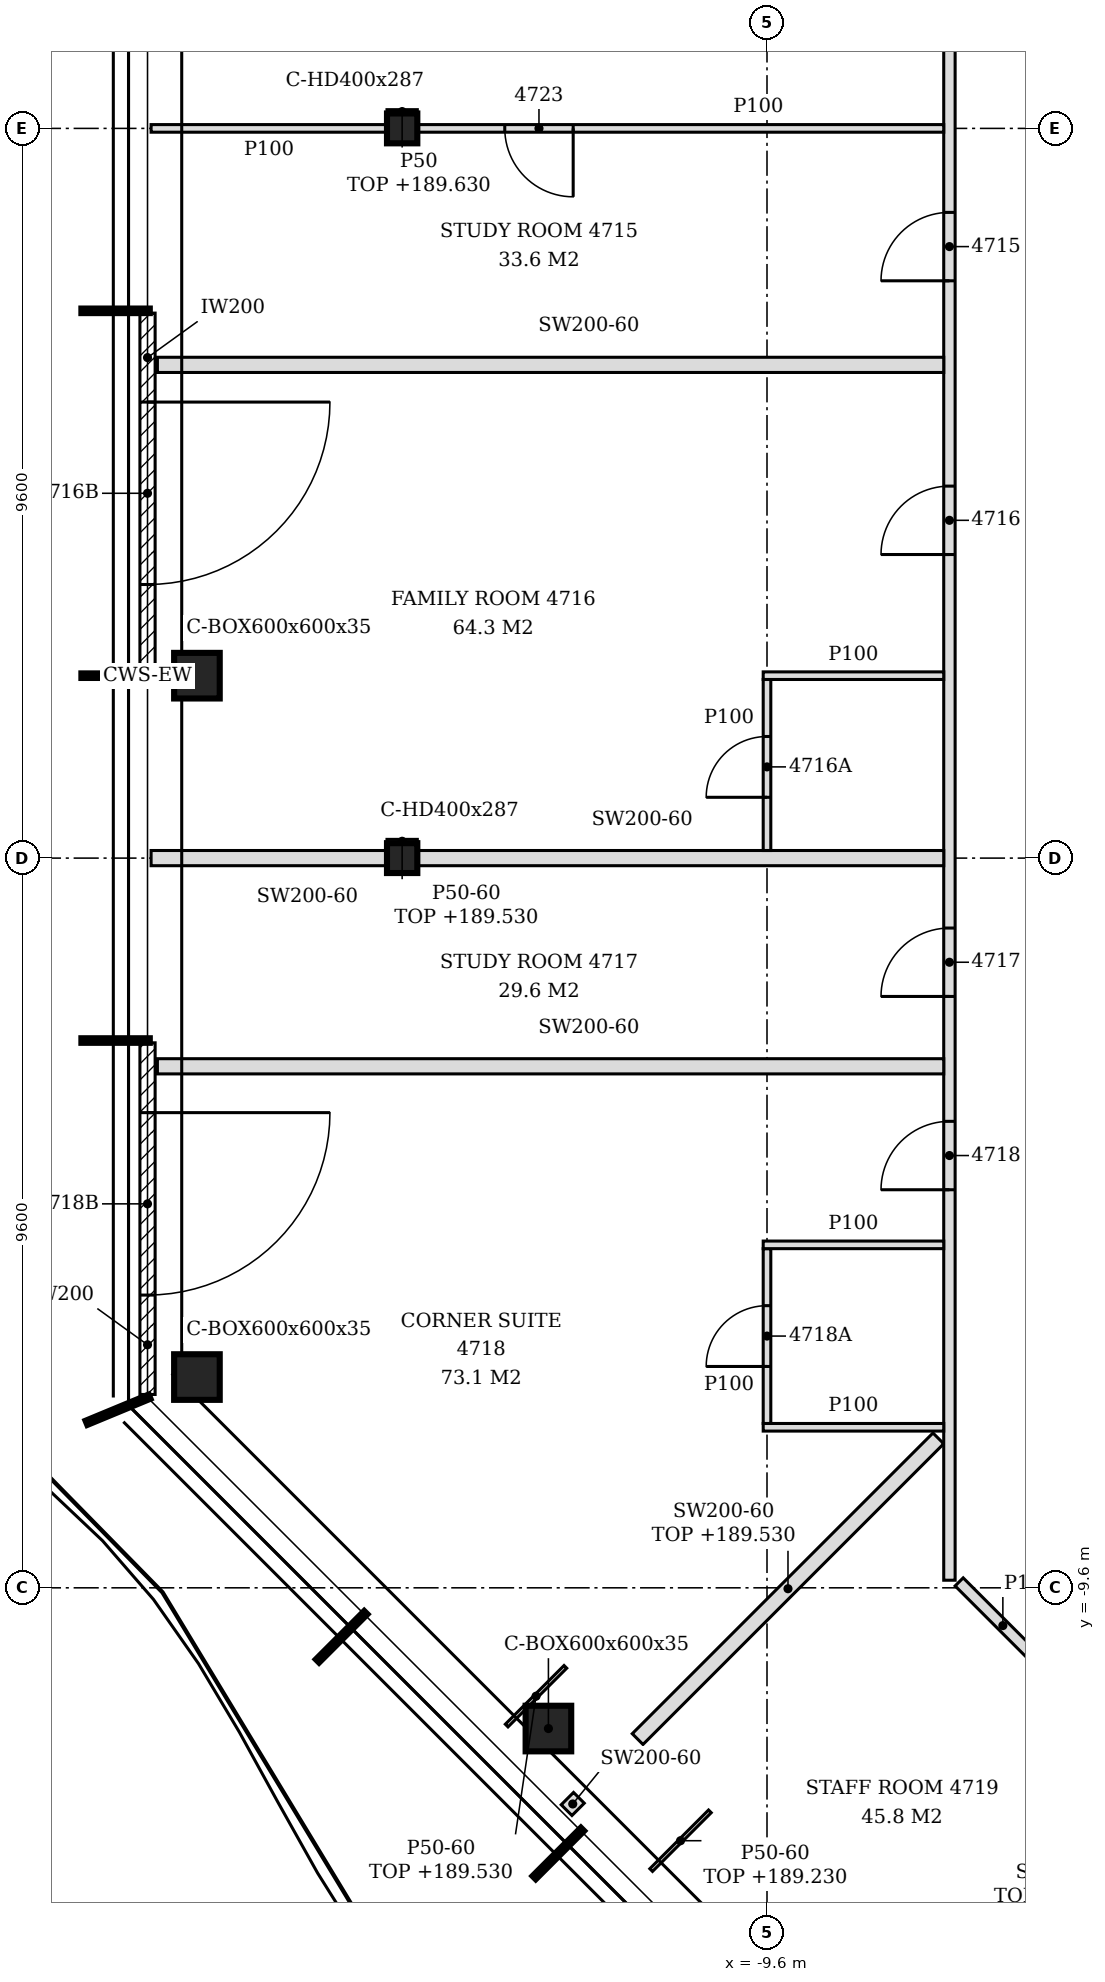
"""IFC4 building model, lengths in metres.
Left out: names, types, materials, properties, quantities, classifications, styles, units other than length and angle.
Written with IfcOpenShell. Run it as: python <this file> out.ifc"""

import sys

from ifc_helpers import new_model, si_unit, direction, frame, frame_2d, origin, origin_2d, place, context, subcontext, project, spatial, polyline, rectangle, hollow_rectangle, i_section, outline, extrude, clip, halfspace, element, fill, save


model = new_model("IFC4")
c1 = context("Model", 3, precision=1e-05, world=origin(), true_north=direction((0.0, 1.0)))
c2 = subcontext(c1, "Body", "Model", "MODEL_VIEW")
j1 = project(units=[si_unit("LENGTHUNIT", "METRE"), si_unit("PLANEANGLEUNIT", "RADIAN")], contexts=[c1])
p1 = place(None, origin())
s1 = spatial("IfcSite", under=j1, at=p1, CompositionType="ELEMENT")
p2 = place(p1, origin())
s2 = spatial("IfcBuilding", under=s1, at=p2, CompositionType="ELEMENT")
p3 = place(p2, frame((0.0, 0.0, 186.6)))
s3 = spatial("IfcBuildingStorey", under=s2, at=p3, CompositionType="ELEMENT", Elevation=186.6)
p4 = place(p3, frame((-17.1, 11.627, -0.15), z_axis=(0.38726387287, -0.258155907814, 0.885088820419), x_axis=(0.554670435147, 0.832070134288, 0.0)))
e1 = element("IfcColumn", 1, at=p4, inside=s3, PredefinedType="COLUMN", context=c2, shape_type="Clipping", body=[
    clip(extrude(hollow_rectangle(XDim=0.6, YDim=0.6, WallThickness=0.035, at=origin_2d()), origin(), (0.0, 0.0, 1.0), 4.067), halfspace(frame((0.0, 0.0, 4.049), z_axis=(0.0, 0.0, 1.0), x_axis=(1.0, 0.0, 0.0)), False)),
])
p5 = place(p3, frame((-17.1, 2.4, -0.15), z_axis=(0.387269873009, -0.258099884367, 0.885102533693), x_axis=(0.55458113914, 0.832129653426, 0.0)))
e2 = element("IfcColumn", 2, at=p5, inside=s3, PredefinedType="COLUMN", context=c2, shape_type="Clipping", body=[
    clip(extrude(hollow_rectangle(XDim=0.6, YDim=0.6, WallThickness=0.035, at=origin_2d()), origin(), (0.0, 0.0, 1.0), 4.067), halfspace(frame((0.0, 0.0, 4.049), z_axis=(0.0, 0.0, 1.0), x_axis=(1.0, 0.0, 0.0)), False)),
])
p6 = place(p3, frame((-17.1, -6.827, -0.15), z_axis=(0.38726387287, -0.258155907814, 0.885088820419), x_axis=(0.554670435147, 0.832070134288, 0.0)))
e3 = element("IfcColumn", 3, at=p6, inside=s3, PredefinedType="COLUMN", context=c2, shape_type="Clipping", body=[
    clip(extrude(hollow_rectangle(XDim=0.6, YDim=0.6, WallThickness=0.035, at=origin_2d()), origin(), (0.0, 0.0, 1.0), 4.067), halfspace(frame((0.0, 0.0, 4.049), z_axis=(0.0, 0.0, 1.0), x_axis=(1.0, 0.0, 0.0)), False)),
])
p7 = place(p3, frame((-12.476, -11.451, -0.15), z_axis=(0.387212850535, -0.258161908255, 0.885109392961), x_axis=(0.554729959787, 0.832030451194, 0.0)))
e4 = element("IfcColumn", 4, at=p7, inside=s3, PredefinedType="COLUMN", context=c2, shape_type="Clipping", body=[
    clip(extrude(hollow_rectangle(XDim=0.6, YDim=0.6, WallThickness=0.035, at=origin_2d()), origin(), (0.0, 0.0, 1.0), 4.067), halfspace(frame((0.0, 0.0, 4.049), z_axis=(0.0, 0.0, 1.0), x_axis=(1.0, 0.0, 0.0)), False)),
])
for number, where, z_axis, x_axis in (
    (5, (-14.4, 0.0, -0.15), (0.0, 0.0, 1.0), (1.0, 0.0, 0.0)),
    (6, (-14.4, 9.6, -0.15), (0.0, 0.0, 1.0), (1.0, 0.0, 0.0)),
):
    element("IfcColumn", number, at=place(p3, frame(where, z_axis=z_axis, x_axis=x_axis)), inside=s3, PredefinedType="COLUMN", context=c2, shape_type="SweptSolid", body=[
        extrude(i_section(OverallWidth=0.399, OverallDepth=0.393, WebThickness=0.023, FlangeThickness=0.037, FilletRadius=0.015, at=origin_2d()), origin(), (0.0, 0.0, 1.0), 3.6),
    ])
p8 = place(p3, frame((-17.75, 7.17, 0.0), z_axis=(0.0, 0.0, 1.0), x_axis=(0.0, -1.0, 0.0)))
e7 = element("IfcWall", 7, at=p8, inside=s3, PredefinedType="NOTDEFINED", context=c2, shape_type="SweptSolid", body=[
    extrude(rectangle(XDim=4.74, YDim=0.2, at=frame_2d((2.37, 0.0))), origin(), (0.0, 0.0, 1.0), 3.45),
])
p9 = place(p8, frame((1.17, 0.0, 0.0)))
e8 = element("IfcOpeningElement", 8, at=p9, cuts=e7, PredefinedType="OPENING", context=c2, shape_type="SweptSolid", body=[
    extrude(rectangle(XDim=2.4, YDim=2.4, at=frame_2d((1.2, 1.2))), frame((0.0, 0.11, 0.0), z_axis=(0.0, -1.0, 0.0), x_axis=(1.0, 0.0, 0.0)), (0.0, 0.0, 1.0), 0.22),
])
p10 = place(p3, frame((-17.75, -2.43, 0.0), z_axis=(0.0, 0.0, 1.0), x_axis=(0.0, -1.0, 0.0)))
e9 = element("IfcWall", 9, at=p10, inside=s3, PredefinedType="NOTDEFINED", context=c2, shape_type="SweptSolid", body=[
    extrude(rectangle(XDim=4.626, YDim=0.2, at=frame_2d((2.313, 0.0))), origin(), (0.0, 0.0, 1.0), 3.45),
])
p11 = place(p10, frame((0.919, 0.0, 0.0)))
e10 = element("IfcOpeningElement", 10, at=p11, cuts=e9, PredefinedType="OPENING", context=c2, shape_type="SweptSolid", body=[
    extrude(rectangle(XDim=2.4, YDim=2.4, at=frame_2d((1.2, 1.2))), frame((0.0, 0.11, 0.0), z_axis=(0.0, -1.0, 0.0), x_axis=(1.0, 0.0, 0.0)), (0.0, 0.0, 1.0), 0.22),
])
p12 = place(p3, frame((-6.678, -16.214, 0.0), z_axis=(0.0, 0.0, 1.0), x_axis=(0.707199650476, 0.707013899698, 0.0)))
e11 = element("IfcWall", 11, at=p12, inside=s3, PredefinedType="PARTITIONING", context=c2, shape_type="SweptSolid", body=[
    extrude(rectangle(XDim=5.257, YDim=0.2, at=frame_2d((2.629, 0.0))), origin(), (0.0, 0.0, 1.0), 2.83),
])
p13 = place(p3, frame((-12.237, -12.525, 0.0), z_axis=(0.0, 0.0, 1.0), x_axis=(0.706574521886, 0.707638640142, 0.0)))
e12 = element("IfcWall", 12, at=p13, inside=s3, PredefinedType="PARTITIONING", context=c2, shape_type="SweptSolid", body=[
    extrude(rectangle(XDim=0.229, YDim=0.2, at=frame_2d((0.115, 0.0))), origin(), (0.0, 0.0, 1.0), 3.45),
])
p14 = place(p3, frame((-11.302, -11.59, 0.0), z_axis=(0.0, 0.0, 1.0), x_axis=(0.707106781187, 0.707106781187, 0.0)))
e13 = element("IfcWall", 13, at=p14, inside=s3, PredefinedType="PARTITIONING", context=c2, shape_type="SweptSolid", body=[
    extrude(rectangle(XDim=5.595, YDim=0.2, at=frame_2d((2.797, 0.0))), origin(), (0.0, 0.0, 1.0), 2.93),
])
p15 = place(p3, frame((-5.922, -10.672, 0.0), z_axis=(0.0, 0.0, 1.0), x_axis=(-0.707031720757, 0.707181833649, 0.0)))
e14 = element("IfcWall", 14, at=p15, inside=s3, PredefinedType="PARTITIONING", context=c2, shape_type="SweptSolid", body=[
    extrude(rectangle(XDim=1.626, YDim=0.15, at=frame_2d((0.813, 0.0))), origin(), (0.0, 0.0, 1.0), 3.45),
])
p16 = place(p3, frame((-7.2, -9.5, 0.0), z_axis=(0.0, 0.0, 1.0), x_axis=(0.0, 1.0, 0.0)))
e15 = element("IfcWall", 15, at=p16, inside=s3, PredefinedType="PARTITIONING", context=c2, shape_type="SweptSolid", body=[
    extrude(outline(polyline([(0.0, 0.0), (23.513, 0.0), (23.513, 3.45), (20.55, 3.45), (20.548, 2.93), (20.35, 2.93), (20.348, 3.45), (15.75, 3.45), (15.748, 2.93), (15.55, 2.93), (15.548, 3.45), (10.95, 3.45), (10.948, 2.93), (10.75, 2.93), (10.748, 3.45), (6.15, 3.45), (6.148, 2.93), (5.95, 2.93), (5.948, 3.45), (1.35, 3.45), (1.348, 2.93), (1.15, 2.93), (1.148, 3.45), (0.0, 3.45), (0.0, 0.0)])), frame((0.0, 0.075, 0.0), z_axis=(0.0, -1.0, 0.0), x_axis=(1.0, 0.0, 0.0)), (0.0, 0.0, 1.0), 0.15),
])
p17 = place(p16, frame((17.095, 0.0, 0.0)))
e16 = element("IfcOpeningElement", 16, at=p17, cuts=e15, PredefinedType="OPENING", context=c2, shape_type="SweptSolid", body=[
    extrude(rectangle(XDim=0.9, YDim=2.1, at=frame_2d((0.45, 1.05))), frame((0.0, 0.085, 0.0), z_axis=(0.0, -1.0, 0.0), x_axis=(1.0, 0.0, 0.0)), (0.0, 0.0, 1.0), 0.17),
])
p18 = place(p16, frame((13.494, 0.0, 0.0)))
e17 = element("IfcOpeningElement", 17, at=p18, cuts=e15, PredefinedType="OPENING", context=c2, shape_type="SweptSolid", body=[
    extrude(rectangle(XDim=0.9, YDim=2.1, at=frame_2d((0.45, 1.05))), frame((0.0, 0.085, 0.0), z_axis=(0.0, -1.0, 0.0), x_axis=(1.0, 0.0, 0.0)), (0.0, 0.0, 1.0), 0.17),
])
p19 = place(p16, frame((7.68, 0.0, 0.0)))
e18 = element("IfcOpeningElement", 18, at=p19, cuts=e15, PredefinedType="OPENING", context=c2, shape_type="SweptSolid", body=[
    extrude(rectangle(XDim=0.9, YDim=2.1, at=frame_2d((0.45, 1.05))), frame((0.0, 0.085, 0.0), z_axis=(0.0, -1.0, 0.0), x_axis=(1.0, 0.0, 0.0)), (0.0, 0.0, 1.0), 0.17),
])
p20 = place(p16, frame((5.137, 0.0, 0.0)))
e19 = element("IfcOpeningElement", 19, at=p20, cuts=e15, PredefinedType="OPENING", context=c2, shape_type="SweptSolid", body=[
    extrude(rectangle(XDim=0.9, YDim=2.1, at=frame_2d((0.45, 1.05))), frame((0.0, 0.085, 0.0), z_axis=(0.0, -1.0, 0.0), x_axis=(1.0, 0.0, 0.0)), (0.0, 0.0, 1.0), 0.17),
])
p21 = place(p3, frame((-9.65, -7.488, 0.0), z_axis=(0.0, 0.0, 1.0), x_axis=(1.0, 0.0, 0.0)))
e20 = element("IfcWall", 20, at=p21, inside=s3, PredefinedType="PARTITIONING", context=c2, shape_type="SweptSolid", body=[
    extrude(rectangle(XDim=2.375, YDim=0.1, at=frame_2d((1.188, 0.0))), origin(), (0.0, 0.0, 1.0), 3.45),
])
p22 = place(p3, frame((-9.6, -7.438, 0.0), z_axis=(0.0, 0.0, 1.0), x_axis=(0.0, 1.0, 0.0)))
e21 = element("IfcWall", 21, at=p22, inside=s3, PredefinedType="PARTITIONING", context=c2, shape_type="SweptSolid", body=[
    extrude(rectangle(XDim=2.3, YDim=0.1, at=frame_2d((1.15, 0.0))), origin(), (0.0, 0.0, 1.0), 3.45),
])
p23 = place(p22, frame((0.75, 0.0, 0.0)))
e22 = element("IfcOpeningElement", 22, at=p23, cuts=e21, PredefinedType="OPENING", context=c2, shape_type="SweptSolid", body=[
    extrude(rectangle(XDim=0.8, YDim=2.1, at=frame_2d((0.4, 1.05))), frame((0.0, 0.06, 0.0), z_axis=(0.0, -1.0, 0.0), x_axis=(1.0, 0.0, 0.0)), (0.0, 0.0, 1.0), 0.12),
])
p24 = place(p3, frame((-9.65, -5.088, 0.0), z_axis=(0.0, 0.0, 1.0), x_axis=(1.0, 0.0, 0.0)))
e23 = element("IfcWall", 23, at=p24, inside=s3, PredefinedType="PARTITIONING", context=c2, shape_type="SweptSolid", body=[
    extrude(rectangle(XDim=2.375, YDim=0.1, at=frame_2d((1.188, 0.0))), origin(), (0.0, 0.0, 1.0), 3.45),
])
p25 = place(p3, frame((-17.62, -2.739, 0.0), z_axis=(0.0, 0.0, 1.0), x_axis=(1.0, 0.0, 0.0)))
e24 = element("IfcWall", 24, at=p25, inside=s3, PredefinedType="PARTITIONING", context=c2, shape_type="SweptSolid", body=[
    extrude(outline(polyline([(0.0, 0.0), (10.345, 0.0), (10.345, 3.45), (3.37, 3.45), (3.368, 2.93), (3.07, 2.93), (3.068, 3.45), (2.245, 3.45), (2.243, 2.93), (1.945, 2.93), (1.943, 3.45), (0.0, 3.45), (0.0, 0.0)])), frame((0.0, 0.1, 0.0), z_axis=(0.0, -1.0, 0.0), x_axis=(1.0, 0.0, 0.0)), (0.0, 0.0, 1.0), 0.2),
])
p26 = place(p3, frame((-17.703, 0.0, 0.0), z_axis=(0.0, 0.0, 1.0), x_axis=(1.0, 0.0, 0.0)))
e25 = element("IfcWall", 25, at=p26, inside=s3, PredefinedType="PARTITIONING", context=c2, shape_type="SweptSolid", body=[
    extrude(outline(polyline([(0.0, 0.0), (3.103, 0.0), (3.104, 3.45), (2.328, 3.45), (2.326, 2.93), (2.028, 2.93), (2.026, 3.45), (0.0, 3.45), (0.0, 0.0)])), frame((0.0, 0.1, 0.0), z_axis=(0.0, -1.0, 0.0), x_axis=(1.0, 0.0, 0.0)), (0.0, 0.0, 1.0), 0.2),
])
p27 = place(p3, frame((-14.2, 0.0, 0.0), z_axis=(0.0, 0.0, 1.0), x_axis=(1.0, 0.0, 0.0)))
e26 = element("IfcWall", 26, at=p27, inside=s3, PredefinedType="PARTITIONING", context=c2, shape_type="SweptSolid", body=[
    extrude(rectangle(XDim=6.926, YDim=0.2, at=frame_2d((3.463, 0.0))), origin(), (0.0, 0.0, 1.0), 3.45),
])
p28 = place(p3, frame((-9.6, 0.1, 0.0), z_axis=(0.0, 0.0, 1.0), x_axis=(0.0, 1.0, 0.0)))
e27 = element("IfcWall", 27, at=p28, inside=s3, PredefinedType="PARTITIONING", context=c2, shape_type="SweptSolid", body=[
    extrude(outline(polyline([(0.0, 0.0), (2.25, 0.0), (2.25, 3.45), (1.35, 3.45), (1.348, 2.93), (1.15, 2.93), (1.148, 3.45), (0.0, 3.45), (0.0, 0.0)])), frame((0.0, 0.05, 0.0), z_axis=(0.0, -1.0, 0.0), x_axis=(1.0, 0.0, 0.0)), (0.0, 0.0, 1.0), 0.1),
])
p29 = place(p28, frame((0.7, 0.0, 0.0)))
e28 = element("IfcOpeningElement", 28, at=p29, cuts=e27, PredefinedType="OPENING", context=c2, shape_type="SweptSolid", body=[
    extrude(rectangle(XDim=0.8, YDim=2.1, at=frame_2d((0.4, 1.05))), frame((0.0, 0.06, 0.0), z_axis=(0.0, -1.0, 0.0), x_axis=(1.0, 0.0, 0.0)), (0.0, 0.0, 1.0), 0.12),
])
p30 = place(p3, frame((-9.65, 2.4, 0.0), z_axis=(0.0, 0.0, 1.0), x_axis=(1.0, 0.0, 0.0)))
e29 = element("IfcWall", 29, at=p30, inside=s3, PredefinedType="PARTITIONING", context=c2, shape_type="SweptSolid", body=[
    extrude(rectangle(XDim=2.375, YDim=0.1, at=frame_2d((1.188, 0.0))), origin(), (0.0, 0.0, 1.0), 3.45),
])
p31 = place(p3, frame((-17.62, 6.489, 0.0), z_axis=(0.0, 0.0, 1.0), x_axis=(1.0, 0.0, 0.0)))
e30 = element("IfcWall", 30, at=p31, inside=s3, PredefinedType="PARTITIONING", context=c2, shape_type="SweptSolid", body=[
    extrude(outline(polyline([(0.0, 0.0), (10.345, 0.0), (10.345, 3.45), (3.37, 3.45), (3.368, 2.93), (3.07, 2.93), (3.068, 3.45), (2.445, 3.45), (2.443, 2.63), (1.745, 2.63), (1.743, 3.45), (0.0, 3.45), (0.0, 0.0)])), frame((0.0, 0.1, 0.0), z_axis=(0.0, -1.0, 0.0), x_axis=(1.0, 0.0, 0.0)), (0.0, 0.0, 1.0), 0.2),
])
p32 = place(p3, frame((-17.703, 9.6, 0.0), z_axis=(0.0, 0.0, 1.0), x_axis=(1.0, 0.0, 0.0)))
e31 = element("IfcWall", 31, at=p32, inside=s3, PredefinedType="PARTITIONING", context=c2, shape_type="SweptSolid", body=[
    extrude(outline(polyline([(0.0, 0.0), (3.103, 0.0), (3.104, 3.45), (2.528, 3.45), (2.526, 2.63), (1.828, 2.63), (1.826, 3.45), (0.0, 3.45), (0.0, 0.0)])), frame((0.0, 0.05, 0.0), z_axis=(0.0, -1.0, 0.0), x_axis=(1.0, 0.0, 0.0)), (0.0, 0.0, 1.0), 0.1),
])
p33 = place(p3, frame((-14.2, 9.6, 0.0), z_axis=(0.0, 0.0, 1.0), x_axis=(1.0, 0.0, 0.0)))
e32 = element("IfcWall", 32, at=p33, inside=s3, PredefinedType="PARTITIONING", context=c2, shape_type="SweptSolid", body=[
    extrude(rectangle(XDim=6.926, YDim=0.1, at=frame_2d((3.463, 0.0))), origin(), (0.0, 0.0, 1.0), 3.45),
])
p34 = place(p33, frame((1.15, 0.0, 0.0)))
e33 = element("IfcOpeningElement", 33, at=p34, cuts=e32, PredefinedType="OPENING", context=c2, shape_type="SweptSolid", body=[
    extrude(rectangle(XDim=0.9, YDim=2.1, at=frame_2d((0.45, 1.05))), frame((0.0, 0.06, 0.0), z_axis=(0.0, -1.0, 0.0), x_axis=(1.0, 0.0, 0.0)), (0.0, 0.0, 1.0), 0.12),
])
p35 = place(p3, frame((-13.025, -11.412, 0.0), z_axis=(0.0, 0.0, 1.0), x_axis=(0.707106781187, 0.707106781187, 0.0)))
e34 = element("IfcWall", 34, at=p35, inside=s3, PredefinedType="PARTITIONING", context=c2, shape_type="SweptSolid", body=[
    extrude(rectangle(XDim=1.093, YDim=0.05, at=frame_2d((0.546, 0.0))), origin(), (0.0, 0.0, 1.0), 2.93),
])
p36 = place(p3, frame((-11.124, -13.313, 0.0), z_axis=(0.0, 0.0, 1.0), x_axis=(0.707106781187, 0.707106781187, 0.0)))
e35 = element("IfcWall", 35, at=p36, inside=s3, PredefinedType="PARTITIONING", context=c2, shape_type="SweptSolid", body=[
    extrude(rectangle(XDim=1.093, YDim=0.05, at=frame_2d((0.546, 0.0))), origin(), (0.0, 0.0, 1.0), 2.63),
])
p37 = place(p3, frame((-14.6, 0.221, 0.0), z_axis=(0.0, 0.0, 1.0), x_axis=(1.0, 0.0, 0.0)))
e36 = element("IfcWall", 36, at=p37, inside=s3, PredefinedType="PARTITIONING", context=c2, shape_type="SweptSolid", body=[
    extrude(rectangle(XDim=0.399, YDim=0.05, at=frame_2d((0.2, 0.0))), origin(), (0.0, 0.0, 1.0), 2.93),
])
p38 = place(p3, frame((-14.6, 9.822, 0.0), z_axis=(0.0, 0.0, 1.0), x_axis=(1.0, 0.0, 0.0)))
e37 = element("IfcWall", 37, at=p38, inside=s3, PredefinedType="PARTITIONING", context=c2, shape_type="SweptSolid", body=[
    extrude(rectangle(XDim=0.399, YDim=0.05, at=frame_2d((0.2, 0.0))), origin(), (0.0, 0.0, 1.0), 3.03),
])
p39 = place(p9, origin())
e38 = element("IfcDoor", 38, at=p39, inside=s3, OperationType="SINGLE_SWING_LEFT", PredefinedType="DOOR", context=c2, shape_type="SweptSolid", body=[
    extrude(rectangle(XDim=2.4, YDim=2.4, at=frame_2d((1.2, 1.2))), frame((0.0, 0.025, 0.0), z_axis=(0.0, -1.0, 0.0), x_axis=(1.0, 0.0, 0.0)), (0.0, 0.0, 1.0), 0.05),
])
fill(e8, e38)
p40 = place(p11, origin())
e39 = element("IfcDoor", 39, at=p40, inside=s3, OperationType="SINGLE_SWING_LEFT", PredefinedType="DOOR", context=c2, shape_type="SweptSolid", body=[
    extrude(rectangle(XDim=2.4, YDim=2.4, at=frame_2d((1.2, 1.2))), frame((0.0, 0.025, 0.0), z_axis=(0.0, -1.0, 0.0), x_axis=(1.0, 0.0, 0.0)), (0.0, 0.0, 1.0), 0.05),
])
fill(e10, e39)
p41 = place(p17, origin())
e40 = element("IfcDoor", 40, at=p41, inside=s3, OperationType="SINGLE_SWING_LEFT", PredefinedType="DOOR", context=c2, shape_type="SweptSolid", body=[
    extrude(rectangle(XDim=0.9, YDim=2.1, at=frame_2d((0.45, 1.05))), frame((0.0, 0.025, 0.0), z_axis=(0.0, -1.0, 0.0), x_axis=(1.0, 0.0, 0.0)), (0.0, 0.0, 1.0), 0.05),
])
fill(e16, e40)
p42 = place(p18, origin())
e41 = element("IfcDoor", 41, at=p42, inside=s3, OperationType="SINGLE_SWING_LEFT", PredefinedType="DOOR", context=c2, shape_type="SweptSolid", body=[
    extrude(rectangle(XDim=0.9, YDim=2.1, at=frame_2d((0.45, 1.05))), frame((0.0, 0.025, 0.0), z_axis=(0.0, -1.0, 0.0), x_axis=(1.0, 0.0, 0.0)), (0.0, 0.0, 1.0), 0.05),
])
fill(e17, e41)
p43 = place(p29, origin())
e42 = element("IfcDoor", 42, at=p43, inside=s3, OperationType="SINGLE_SWING_LEFT", PredefinedType="DOOR", context=c2, shape_type="SweptSolid", body=[
    extrude(rectangle(XDim=0.8, YDim=2.1, at=frame_2d((0.4, 1.05))), frame((0.0, 0.025, 0.0), z_axis=(0.0, -1.0, 0.0), x_axis=(1.0, 0.0, 0.0)), (0.0, 0.0, 1.0), 0.05),
])
fill(e28, e42)
p44 = place(p19, origin())
e43 = element("IfcDoor", 43, at=p44, inside=s3, OperationType="SINGLE_SWING_LEFT", PredefinedType="DOOR", context=c2, shape_type="SweptSolid", body=[
    extrude(rectangle(XDim=0.9, YDim=2.1, at=frame_2d((0.45, 1.05))), frame((0.0, 0.025, 0.0), z_axis=(0.0, -1.0, 0.0), x_axis=(1.0, 0.0, 0.0)), (0.0, 0.0, 1.0), 0.05),
])
fill(e18, e43)
p45 = place(p20, origin())
e44 = element("IfcDoor", 44, at=p45, inside=s3, OperationType="SINGLE_SWING_LEFT", PredefinedType="DOOR", context=c2, shape_type="SweptSolid", body=[
    extrude(rectangle(XDim=0.9, YDim=2.1, at=frame_2d((0.45, 1.05))), frame((0.0, 0.025, 0.0), z_axis=(0.0, -1.0, 0.0), x_axis=(1.0, 0.0, 0.0)), (0.0, 0.0, 1.0), 0.05),
])
fill(e19, e44)
p46 = place(p23, origin())
e45 = element("IfcDoor", 45, at=p46, inside=s3, OperationType="SINGLE_SWING_LEFT", PredefinedType="DOOR", context=c2, shape_type="SweptSolid", body=[
    extrude(rectangle(XDim=0.8, YDim=2.1, at=frame_2d((0.4, 1.05))), frame((0.0, 0.025, 0.0), z_axis=(0.0, -1.0, 0.0), x_axis=(1.0, 0.0, 0.0)), (0.0, 0.0, 1.0), 0.05),
])
fill(e22, e45)
p47 = place(p34, frame((0.9, 0.0, 0.0), z_axis=(0.0, 0.0, 1.0), x_axis=(-1.0, 0.0, 0.0)))
e46 = element("IfcDoor", 46, at=p47, inside=s3, OperationType="SINGLE_SWING_LEFT", PredefinedType="DOOR", context=c2, shape_type="SweptSolid", body=[
    extrude(rectangle(XDim=0.9, YDim=2.1, at=frame_2d((0.45, 1.05))), frame((0.0, 0.025, 0.0), z_axis=(0.0, -1.0, 0.0), x_axis=(1.0, 0.0, 0.0)), (0.0, 0.0, 1.0), 0.05),
])
fill(e33, e46)
save(model, sys.argv[1])
